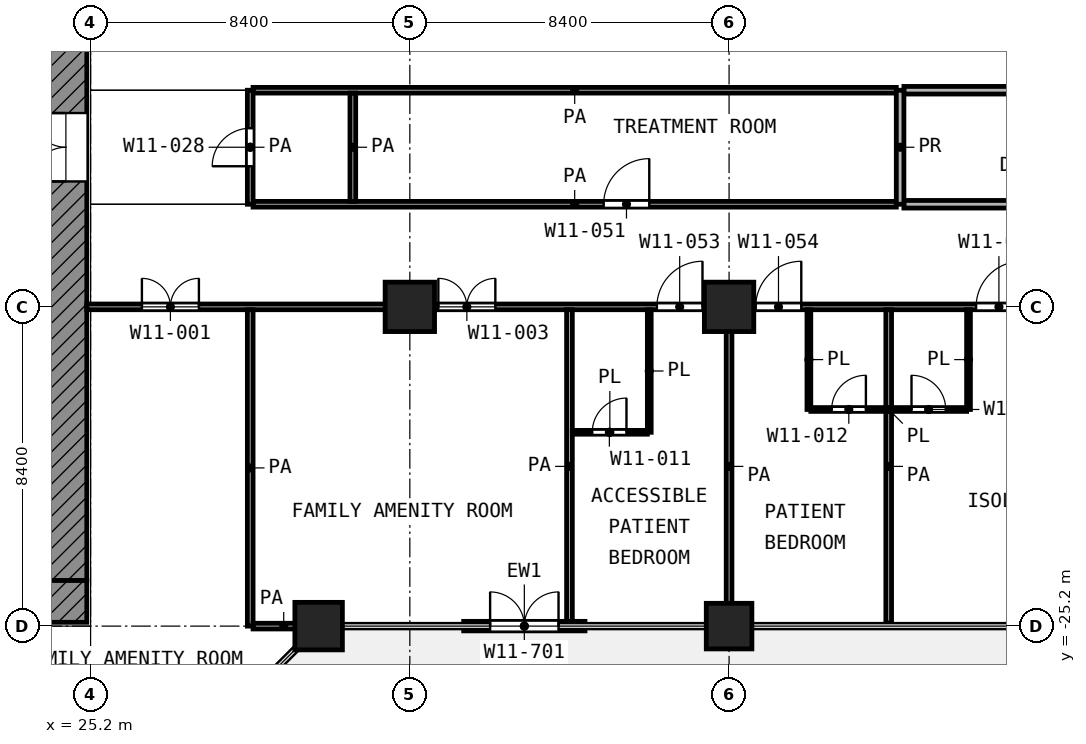
"""IFC4 building model, lengths in metres.
Left out: names, types, materials, properties, quantities, classifications, styles, units other than length and angle.
Written with IfcOpenShell. Run it as: python <this file> out.ifc"""

import sys

from ifc_helpers import new_model, si_unit, direction, frame, frame_2d, origin, origin_2d, place, context, subcontext, project, spatial, rectangle, extrude, element, fill, save


model = new_model("IFC4")
c1 = context("Model", 3, precision=1e-05, world=origin(), true_north=direction((0.0, 1.0)))
c2 = subcontext(c1, "Body", "Model", "MODEL_VIEW")
j1 = project(units=[si_unit("LENGTHUNIT", "METRE"), si_unit("PLANEANGLEUNIT", "RADIAN")], contexts=[c1])
p1 = place(None, origin())
s1 = spatial("IfcSite", under=j1, at=p1, CompositionType="ELEMENT")
p2 = place(p1, origin())
s2 = spatial("IfcBuilding", under=s1, at=p2, CompositionType="ELEMENT")
p3 = place(p2, frame((0.0, 0.0, 51.8)))
s3 = spatial("IfcBuildingStorey", under=s2, at=p3, CompositionType="ELEMENT", Elevation=51.8)
for number, where, z_axis, x_axis in (
    (1, (33.6, -16.8, 0.0), (0.0, 0.0, 1.0), (1.0, 0.0, 0.0)),
    (2, (42.0, -16.8, 0.0), (0.0, 0.0, 1.0), (1.0, 0.0, 0.0)),
):
    element("IfcColumn", number, at=place(p3, frame(where, z_axis=z_axis, x_axis=x_axis)), inside=s3, PredefinedType="COLUMN", context=c2, shape_type="SweptSolid", body=[
        extrude(rectangle(XDim=1.3, YDim=1.3, at=origin_2d()), origin(), (0.0, 0.0, 1.0), 4.2),
    ])
p4 = place(p3, frame((31.2, -25.2, 0.0), z_axis=(0.0, 0.0, 1.0), x_axis=(1.0, 0.0, 0.0)))
e3 = element("IfcColumn", 3, at=p4, inside=s3, PredefinedType="COLUMN", context=c2, shape_type="SweptSolid", body=[
    extrude(rectangle(XDim=1.25, YDim=1.25, at=origin_2d()), origin(), (0.0, 0.0, 1.0), 4.2),
])
p5 = place(p3, frame((42.0, -25.2, 0.0), z_axis=(0.0, 0.0, 1.0), x_axis=(1.0, 0.0, 0.0)))
e4 = element("IfcColumn", 4, at=p5, inside=s3, PredefinedType="COLUMN", context=c2, shape_type="SweptSolid", body=[
    extrude(rectangle(XDim=1.2, YDim=1.2, at=origin_2d()), origin(), (0.0, 0.0, 1.0), 4.2),
])
p6 = place(p3, frame((35.017, -25.2, 0.0), z_axis=(0.0, 0.0, 1.0), x_axis=(1.0, 0.0, 0.0)))
e5 = element("IfcWall", 5, at=p6, inside=s3, PredefinedType="SOLIDWALL", context=c2, shape_type="SweptSolid", body=[
    extrude(rectangle(XDim=3.192, YDim=0.25, at=frame_2d((1.596, 0.0))), origin(), (0.0, 0.0, 1.0), 3.78),
])
p7 = place(p6, frame((0.696, 0.0, 0.0)))
e6 = element("IfcOpeningElement", 6, at=p7, cuts=e5, PredefinedType="OPENING", context=c2, shape_type="SweptSolid", body=[
    extrude(rectangle(XDim=1.8, YDim=2.1, at=frame_2d((0.9, 1.05))), frame((0.0, 0.135, 0.0), z_axis=(0.0, -1.0, 0.0), x_axis=(1.0, 0.0, 0.0)), (0.0, 0.0, 1.0), 0.27),
])
p8 = place(p3, frame((24.55, -24.0, 0.0), z_axis=(0.0, 0.0, 1.0), x_axis=(0.0, 1.0, 0.0)))
e7 = element("IfcWall", 7, at=p8, inside=s3, PredefinedType="SHEAR", context=c2, shape_type="SweptSolid", body=[
    extrude(rectangle(XDim=18.6, YDim=1.1, at=frame_2d((9.3, 0.0))), origin(), (0.0, 0.0, 1.0), 3.9),
])
p9 = place(p8, frame((10.5, 0.0, 0.0)))
e8 = element("IfcOpeningElement", 8, at=p9, cuts=e7, PredefinedType="OPENING", context=c2, shape_type="SweptSolid", body=[
    extrude(rectangle(XDim=1.8, YDim=2.1, at=frame_2d((0.9, 1.05))), frame((0.0, 0.56, 0.0), z_axis=(0.0, -1.0, 0.0), x_axis=(1.0, 0.0, 0.0)), (0.0, 0.0, 1.0), 1.12),
])
p10 = place(p3, frame((24.55, -25.1, 0.0), z_axis=(0.0, 0.0, 1.0), x_axis=(0.0, 1.0, 0.0)))
e9 = element("IfcWall", 9, at=p10, inside=s3, PredefinedType="SHEAR", context=c2, shape_type="SweptSolid", body=[
    extrude(rectangle(XDim=1.1, YDim=1.1, at=frame_2d((0.55, 0.0))), origin(), (0.0, 0.0, 1.0), 3.9),
])
p11 = place(p3, frame((37.875, -20.1, 0.0), z_axis=(0.0, 0.0, 1.0), x_axis=(1.0, 0.0, 0.0)))
e10 = element("IfcWall", 10, at=p11, inside=s3, PredefinedType="PARTITIONING", context=c2, shape_type="SweptSolid", body=[
    extrude(rectangle(XDim=1.975, YDim=0.1, at=frame_2d((0.988, 0.0))), origin(), (0.0, 0.0, 1.0), 3.9),
])
p12 = place(p11, frame((0.525, 0.0, 0.0)))
e11 = element("IfcOpeningElement", 11, at=p12, cuts=e10, PredefinedType="OPENING", context=c2, shape_type="SweptSolid", body=[
    extrude(rectangle(XDim=0.9, YDim=2.1, at=frame_2d((0.45, 1.05))), frame((0.0, 0.06, 0.0), z_axis=(0.0, -1.0, 0.0), x_axis=(1.0, 0.0, 0.0)), (0.0, 0.0, 1.0), 0.12),
])
p13 = place(p3, frame((44.15, -19.5, 0.0), z_axis=(0.0, 0.0, 1.0), x_axis=(1.0, 0.0, 0.0)))
e12 = element("IfcWall", 12, at=p13, inside=s3, PredefinedType="PARTITIONING", context=c2, shape_type="SweptSolid", body=[
    extrude(rectangle(XDim=4.1, YDim=0.1, at=frame_2d((2.05, 0.0))), origin(), (0.0, 0.0, 1.0), 3.9),
])
p14 = place(p13, frame((0.55, 0.0, 0.0)))
e13 = element("IfcOpeningElement", 13, at=p14, cuts=e12, PredefinedType="OPENING", context=c2, shape_type="SweptSolid", body=[
    extrude(rectangle(XDim=0.9, YDim=2.1, at=frame_2d((0.45, 1.05))), frame((0.0, 0.06, 0.0), z_axis=(0.0, -1.0, 0.0), x_axis=(1.0, 0.0, 0.0)), (0.0, 0.0, 1.0), 0.12),
])
p15 = place(p13, frame((2.65, 0.0, 0.0)))
e14 = element("IfcOpeningElement", 14, at=p15, cuts=e12, PredefinedType="OPENING", context=c2, shape_type="SweptSolid", body=[
    extrude(rectangle(XDim=0.9, YDim=2.1, at=frame_2d((0.45, 1.05))), frame((0.0, 0.06, 0.0), z_axis=(0.0, -1.0, 0.0), x_axis=(1.0, 0.0, 0.0)), (0.0, 0.0, 1.0), 0.12),
])
p16 = place(p3, frame((39.9, -20.1, 0.0), z_axis=(0.0, 0.0, 1.0), x_axis=(0.0, 1.0, 0.0)))
e15 = element("IfcWall", 15, at=p16, inside=s3, PredefinedType="PARTITIONING", context=c2, shape_type="SweptSolid", body=[
    extrude(rectangle(XDim=3.225, YDim=0.1, at=frame_2d((1.613, 0.0))), origin(), (0.0, 0.0, 1.0), 3.9),
])
for number, where, z_axis, x_axis in (
    (16, (44.1, -19.5, 0.0), (0.0, 0.0, 1.0), (0.0, 1.0, 0.0)),
    (17, (48.3, -19.5, 0.0), (0.0, 0.0, 1.0), (0.0, 1.0, 0.0)),
):
    element("IfcWall", number, at=place(p3, frame(where, z_axis=z_axis, x_axis=x_axis)), inside=s3, PredefinedType="PARTITIONING", context=c2, shape_type="SweptSolid", body=[
        extrude(rectangle(XDim=2.625, YDim=0.1, at=frame_2d((1.312, 0.0))), origin(), (0.0, 0.0, 1.0), 3.9),
    ])
p17 = place(p3, frame((29.475, -25.2, 0.0), z_axis=(0.0, 0.0, 1.0), x_axis=(1.0, 0.0, 0.0)))
e18 = element("IfcWall", 18, at=p17, inside=s3, PredefinedType="PARTITIONING", context=c2, shape_type="SweptSolid", body=[
    extrude(rectangle(XDim=1.612, YDim=0.15, at=frame_2d((0.806, 0.0))), origin(), (0.0, 0.0, 1.0), 3.9),
])
p18 = place(p3, frame((25.1, -16.8, 0.0), z_axis=(0.0, 0.0, 1.0), x_axis=(1.0, 0.0, 0.0)))
e19 = element("IfcWall", 19, at=p18, inside=s3, PredefinedType="PARTITIONING", context=c2, shape_type="SweptSolid", body=[
    extrude(rectangle(XDim=54.62, YDim=0.15, at=frame_2d((27.31, 0.0))), origin(), (0.0, 0.0, 1.0), 3.9),
])
p19 = place(p18, frame((1.45, 0.0, 0.0)))
e20 = element("IfcOpeningElement", 20, at=p19, cuts=e19, PredefinedType="OPENING", context=c2, shape_type="SweptSolid", body=[
    extrude(rectangle(XDim=1.5, YDim=2.1, at=frame_2d((0.75, 1.05))), frame((0.0, 0.085, 0.0), z_axis=(0.0, -1.0, 0.0), x_axis=(1.0, 0.0, 0.0)), (0.0, 0.0, 1.0), 0.17),
])
p20 = place(p18, frame((9.25, 0.0, 0.0)))
e21 = element("IfcOpeningElement", 21, at=p20, cuts=e19, PredefinedType="OPENING", context=c2, shape_type="SweptSolid", body=[
    extrude(rectangle(XDim=1.5, YDim=2.1, at=frame_2d((0.75, 1.05))), frame((0.0, 0.085, 0.0), z_axis=(0.0, -1.0, 0.0), x_axis=(1.0, 0.0, 0.0)), (0.0, 0.0, 1.0), 0.17),
])
p21 = place(p18, frame((15.0, 0.0, 0.0)))
e22 = element("IfcOpeningElement", 22, at=p21, cuts=e19, PredefinedType="OPENING", context=c2, shape_type="SweptSolid", body=[
    extrude(rectangle(XDim=1.2, YDim=2.1, at=frame_2d((0.6, 1.05))), frame((0.0, 0.085, 0.0), z_axis=(0.0, -1.0, 0.0), x_axis=(1.0, 0.0, 0.0)), (0.0, 0.0, 1.0), 0.17),
])
p22 = place(p18, frame((17.6, 0.0, 0.0)))
e23 = element("IfcOpeningElement", 23, at=p22, cuts=e19, PredefinedType="OPENING", context=c2, shape_type="SweptSolid", body=[
    extrude(rectangle(XDim=1.2, YDim=2.1, at=frame_2d((0.6, 1.05))), frame((0.0, 0.085, 0.0), z_axis=(0.0, -1.0, 0.0), x_axis=(1.0, 0.0, 0.0)), (0.0, 0.0, 1.0), 0.17),
])
p23 = place(p18, frame((26.2, 0.0, 0.0)))
e24 = element("IfcOpeningElement", 24, at=p23, cuts=e19, PredefinedType="OPENING", context=c2, shape_type="SweptSolid", body=[
    extrude(rectangle(XDim=1.2, YDim=2.1, at=frame_2d((0.6, 1.05))), frame((0.0, 0.085, 0.0), z_axis=(0.0, -1.0, 0.0), x_axis=(1.0, 0.0, 0.0)), (0.0, 0.0, 1.0), 0.17),
])
p24 = place(p18, frame((23.4, 0.0, 0.0)))
e25 = element("IfcOpeningElement", 25, at=p24, cuts=e19, PredefinedType="OPENING", context=c2, shape_type="SweptSolid", body=[
    extrude(rectangle(XDim=1.2, YDim=2.1, at=frame_2d((0.6, 1.05))), frame((0.0, 0.085, 0.0), z_axis=(0.0, -1.0, 0.0), x_axis=(1.0, 0.0, 0.0)), (0.0, 0.0, 1.0), 0.17),
])
p25 = place(p18, frame((28.45, 0.0, 0.0)))
e26 = element("IfcOpeningElement", 26, at=p25, cuts=e19, PredefinedType="OPENING", context=c2, shape_type="SweptSolid", body=[
    extrude(rectangle(XDim=1.2, YDim=2.1, at=frame_2d((0.6, 1.05))), frame((0.0, 0.085, 0.0), z_axis=(0.0, -1.0, 0.0), x_axis=(1.0, 0.0, 0.0)), (0.0, 0.0, 1.0), 0.17),
])
p26 = place(p18, frame((31.8, 0.0, 0.0)))
e27 = element("IfcOpeningElement", 27, at=p26, cuts=e19, PredefinedType="OPENING", context=c2, shape_type="SweptSolid", body=[
    extrude(rectangle(XDim=1.2, YDim=2.1, at=frame_2d((0.6, 1.05))), frame((0.0, 0.085, 0.0), z_axis=(0.0, -1.0, 0.0), x_axis=(1.0, 0.0, 0.0)), (0.0, 0.0, 1.0), 0.17),
])
p27 = place(p18, frame((30.35, 0.0, 0.0)))
e28 = element("IfcOpeningElement", 28, at=p27, cuts=e19, PredefinedType="OPENING", context=c2, shape_type="SweptSolid", body=[
    extrude(rectangle(XDim=1.1, YDim=2.1, at=frame_2d((0.55, 1.05))), frame((0.0, 0.085, 0.0), z_axis=(0.0, -1.0, 0.0), x_axis=(1.0, 0.0, 0.0)), (0.0, 0.0, 1.0), 0.17),
])
p28 = place(p18, frame((40.2, 0.0, 0.0)))
e29 = element("IfcOpeningElement", 29, at=p28, cuts=e19, PredefinedType="OPENING", context=c2, shape_type="SweptSolid", body=[
    extrude(rectangle(XDim=1.2, YDim=2.1, at=frame_2d((0.6, 1.05))), frame((0.0, 0.085, 0.0), z_axis=(0.0, -1.0, 0.0), x_axis=(1.0, 0.0, 0.0)), (0.0, 0.0, 1.0), 0.17),
])
p29 = place(p18, frame((43.1, 0.0, 0.0)))
e30 = element("IfcOpeningElement", 30, at=p29, cuts=e19, PredefinedType="OPENING", context=c2, shape_type="SweptSolid", body=[
    extrude(rectangle(XDim=1.2, YDim=2.1, at=frame_2d((0.6, 1.05))), frame((0.0, 0.085, 0.0), z_axis=(0.0, -1.0, 0.0), x_axis=(1.0, 0.0, 0.0)), (0.0, 0.0, 1.0), 0.17),
])
p30 = place(p18, frame((51.2, 0.0, 0.0)))
e31 = element("IfcOpeningElement", 31, at=p30, cuts=e19, PredefinedType="OPENING", context=c2, shape_type="SweptSolid", body=[
    extrude(rectangle(XDim=1.5, YDim=2.1, at=frame_2d((0.75, 1.05))), frame((0.0, 0.085, 0.0), z_axis=(0.0, -1.0, 0.0), x_axis=(1.0, 0.0, 0.0)), (0.0, 0.0, 1.0), 0.17),
])
p31 = place(p3, frame((29.475, -14.1, 0.0), z_axis=(0.0, 0.0, 1.0), x_axis=(1.0, 0.0, 0.0)))
e32 = element("IfcWall", 32, at=p31, inside=s3, PredefinedType="PARTITIONING", context=c2, shape_type="SweptSolid", body=[
    extrude(rectangle(XDim=16.925, YDim=0.15, at=frame_2d((8.462, 0.0))), origin(), (0.0, 0.0, 1.0), 3.9),
])
p32 = place(p31, frame((9.225, 0.0, 0.0)))
e33 = element("IfcOpeningElement", 33, at=p32, cuts=e32, PredefinedType="OPENING", context=c2, shape_type="SweptSolid", body=[
    extrude(rectangle(XDim=1.2, YDim=2.1, at=frame_2d((0.6, 1.05))), frame((0.0, 0.085, 0.0), z_axis=(0.0, -1.0, 0.0), x_axis=(1.0, 0.0, 0.0)), (0.0, 0.0, 1.0), 0.17),
])
p33 = place(p3, frame((29.475, -11.1, 0.0), z_axis=(0.0, 0.0, 1.0), x_axis=(1.0, 0.0, 0.0)))
e34 = element("IfcWall", 34, at=p33, inside=s3, PredefinedType="PARTITIONING", context=c2, shape_type="SweptSolid", body=[
    extrude(rectangle(XDim=16.925, YDim=0.15, at=frame_2d((8.462, 0.0))), origin(), (0.0, 0.0, 1.0), 3.9),
])
p34 = place(p3, frame((29.4, -25.2, 0.0), z_axis=(0.0, 0.0, 1.0), x_axis=(0.0, 1.0, 0.0)))
e35 = element("IfcWall", 35, at=p34, inside=s3, PredefinedType="PARTITIONING", context=c2, shape_type="SweptSolid", body=[
    extrude(rectangle(XDim=8.325, YDim=0.15, at=frame_2d((4.163, 0.0))), origin(), (0.0, 0.0, 1.0), 3.9),
])
p35 = place(p3, frame((29.4, -14.1, 0.0), z_axis=(0.0, 0.0, 1.0), x_axis=(0.0, 1.0, 0.0)))
e36 = element("IfcWall", 36, at=p35, inside=s3, PredefinedType="PARTITIONING", context=c2, shape_type="SweptSolid", body=[
    extrude(rectangle(XDim=3.0, YDim=0.15, at=frame_2d((1.5, 0.0))), origin(), (0.0, 0.0, 1.0), 3.9),
])
p36 = place(p35, frame((1.0, 0.0, 0.0)))
e37 = element("IfcOpeningElement", 37, at=p36, cuts=e36, PredefinedType="OPENING", context=c2, shape_type="SweptSolid", body=[
    extrude(rectangle(XDim=1.0, YDim=2.1, at=frame_2d((0.5, 1.05))), frame((0.0, 0.085, 0.0), z_axis=(0.0, -1.0, 0.0), x_axis=(1.0, 0.0, 0.0)), (0.0, 0.0, 1.0), 0.17),
])
p37 = place(p3, frame((32.1, -14.025, 0.0), z_axis=(0.0, 0.0, 1.0), x_axis=(0.0, 1.0, 0.0)))
e38 = element("IfcWall", 38, at=p37, inside=s3, PredefinedType="PARTITIONING", context=c2, shape_type="SweptSolid", body=[
    extrude(rectangle(XDim=2.85, YDim=0.15, at=frame_2d((1.425, 0.0))), origin(), (0.0, 0.0, 1.0), 3.9),
])
for number, where, z_axis, x_axis in (
    (39, (37.8, -25.12, 0.0), (0.0, 0.0, 1.0), (0.0, 1.0, 0.0)),
    (40, (42.0, -25.12, 0.0), (0.0, 0.0, 1.0), (0.0, 1.0, 0.0)),
    (41, (46.2, -25.12, 0.0), (0.0, 0.0, 1.0), (0.0, 1.0, 0.0)),
):
    element("IfcWall", number, at=place(p3, frame(where, z_axis=z_axis, x_axis=x_axis)), inside=s3, PredefinedType="PARTITIONING", context=c2, shape_type="SweptSolid", body=[
        extrude(rectangle(XDim=8.245, YDim=0.15, at=frame_2d((4.123, 0.0))), origin(), (0.0, 0.0, 1.0), 3.9),
    ])
p38 = place(p3, frame((46.6, -14.1, 0.0), z_axis=(0.0, 0.0, 1.0), x_axis=(1.0, 0.0, 0.0)))
e42 = element("IfcWall", 42, at=p38, inside=s3, PredefinedType="PARTITIONING", context=c2, shape_type="SweptSolid", body=[
    extrude(rectangle(XDim=12.1, YDim=0.2, at=frame_2d((6.05, 0.0))), origin(), (0.0, 0.0, 1.0), 3.9),
])
p39 = place(p3, frame((46.6, -11.1, 0.0), z_axis=(0.0, 0.0, 1.0), x_axis=(1.0, 0.0, 0.0)))
e43 = element("IfcWall", 43, at=p39, inside=s3, PredefinedType="PARTITIONING", context=c2, shape_type="SweptSolid", body=[
    extrude(rectangle(XDim=12.1, YDim=0.2, at=frame_2d((6.05, 0.0))), origin(), (0.0, 0.0, 1.0), 3.9),
])
p40 = place(p39, frame((5.45, 0.0, 0.0)))
e44 = element("IfcOpeningElement", 44, at=p40, cuts=e43, PredefinedType="OPENING", context=c2, shape_type="SweptSolid", body=[
    extrude(rectangle(XDim=1.2, YDim=2.1, at=frame_2d((0.6, 1.05))), frame((0.0, 0.11, 0.0), z_axis=(0.0, -1.0, 0.0), x_axis=(1.0, 0.0, 0.0)), (0.0, 0.0, 1.0), 0.22),
])
p41 = place(p3, frame((46.5, -14.1, 0.0), z_axis=(0.0, 0.0, 1.0), x_axis=(0.0, 1.0, 0.0)))
e45 = element("IfcWall", 45, at=p41, inside=s3, PredefinedType="PARTITIONING", context=c2, shape_type="SweptSolid", body=[
    extrude(rectangle(XDim=3.0, YDim=0.2, at=frame_2d((1.5, 0.0))), origin(), (0.0, 0.0, 1.0), 3.9),
])
p42 = place(p7, origin())
e46 = element("IfcDoor", 46, at=p42, inside=s3, OperationType="DOUBLE_DOOR_SINGLE_SWING", PredefinedType="DOOR", context=c2, shape_type="SweptSolid", body=[
    extrude(rectangle(XDim=1.8, YDim=2.1, at=frame_2d((0.9, 1.05))), frame((0.0, 0.025, 0.0), z_axis=(0.0, -1.0, 0.0), x_axis=(1.0, 0.0, 0.0)), (0.0, 0.0, 1.0), 0.05),
])
fill(e6, e46)
p43 = place(p9, origin())
e47 = element("IfcDoor", 47, at=p43, inside=s3, OperationType="DOUBLE_DOOR_SINGLE_SWING", PredefinedType="DOOR", context=c2, shape_type="SweptSolid", body=[
    extrude(rectangle(XDim=1.8, YDim=2.1, at=frame_2d((0.9, 1.05))), frame((0.0, 0.025, 0.0), z_axis=(0.0, -1.0, 0.0), x_axis=(1.0, 0.0, 0.0)), (0.0, 0.0, 1.0), 0.05),
])
fill(e8, e47)
p44 = place(p19, origin())
e48 = element("IfcDoor", 48, at=p44, inside=s3, OperationType="DOUBLE_DOOR_SINGLE_SWING", PredefinedType="DOOR", context=c2, shape_type="SweptSolid", body=[
    extrude(rectangle(XDim=1.5, YDim=2.1, at=frame_2d((0.75, 1.05))), frame((0.0, 0.025, 0.0), z_axis=(0.0, -1.0, 0.0), x_axis=(1.0, 0.0, 0.0)), (0.0, 0.0, 1.0), 0.05),
])
fill(e20, e48)
p45 = place(p32, origin())
e49 = element("IfcDoor", 49, at=p45, inside=s3, OperationType="SINGLE_SWING_RIGHT", PredefinedType="DOOR", context=c2, shape_type="SweptSolid", body=[
    extrude(rectangle(XDim=1.2, YDim=2.1, at=frame_2d((0.6, 1.05))), frame((0.0, 0.025, 0.0), z_axis=(0.0, -1.0, 0.0), x_axis=(1.0, 0.0, 0.0)), (0.0, 0.0, 1.0), 0.05),
])
fill(e33, e49)
p46 = place(p20, origin())
e50 = element("IfcDoor", 50, at=p46, inside=s3, OperationType="DOUBLE_DOOR_SINGLE_SWING", PredefinedType="DOOR", context=c2, shape_type="SweptSolid", body=[
    extrude(rectangle(XDim=1.5, YDim=2.1, at=frame_2d((0.75, 1.05))), frame((0.0, 0.025, 0.0), z_axis=(0.0, -1.0, 0.0), x_axis=(1.0, 0.0, 0.0)), (0.0, 0.0, 1.0), 0.05),
])
fill(e21, e50)
p47 = place(p21, origin())
e51 = element("IfcDoor", 51, at=p47, inside=s3, OperationType="SINGLE_SWING_RIGHT", PredefinedType="DOOR", context=c2, shape_type="SweptSolid", body=[
    extrude(rectangle(XDim=1.2, YDim=2.1, at=frame_2d((0.6, 1.05))), frame((0.0, 0.025, 0.0), z_axis=(0.0, -1.0, 0.0), x_axis=(1.0, 0.0, 0.0)), (0.0, 0.0, 1.0), 0.05),
])
fill(e22, e51)
p48 = place(p12, origin())
e52 = element("IfcDoor", 52, at=p48, inside=s3, OperationType="SINGLE_SWING_RIGHT", PredefinedType="DOOR", context=c2, shape_type="SweptSolid", body=[
    extrude(rectangle(XDim=0.9, YDim=2.1, at=frame_2d((0.45, 1.05))), frame((0.0, 0.025, 0.0), z_axis=(0.0, -1.0, 0.0), x_axis=(1.0, 0.0, 0.0)), (0.0, 0.0, 1.0), 0.05),
])
fill(e11, e52)
p49 = place(p22, origin())
e53 = element("IfcDoor", 53, at=p49, inside=s3, OperationType="SINGLE_SWING_RIGHT", PredefinedType="DOOR", context=c2, shape_type="SweptSolid", body=[
    extrude(rectangle(XDim=1.2, YDim=2.1, at=frame_2d((0.6, 1.05))), frame((0.0, 0.025, 0.0), z_axis=(0.0, -1.0, 0.0), x_axis=(1.0, 0.0, 0.0)), (0.0, 0.0, 1.0), 0.05),
])
fill(e23, e53)
p50 = place(p14, origin())
e54 = element("IfcDoor", 54, at=p50, inside=s3, OperationType="SINGLE_SWING_RIGHT", PredefinedType="DOOR", context=c2, shape_type="SweptSolid", body=[
    extrude(rectangle(XDim=0.9, YDim=2.1, at=frame_2d((0.45, 1.05))), frame((0.0, 0.025, 0.0), z_axis=(0.0, -1.0, 0.0), x_axis=(1.0, 0.0, 0.0)), (0.0, 0.0, 1.0), 0.05),
])
fill(e13, e54)
p51 = place(p24, origin())
e55 = element("IfcDoor", 55, at=p51, inside=s3, OperationType="SINGLE_SWING_RIGHT", PredefinedType="DOOR", context=c2, shape_type="SweptSolid", body=[
    extrude(rectangle(XDim=1.2, YDim=2.1, at=frame_2d((0.6, 1.05))), frame((0.0, 0.025, 0.0), z_axis=(0.0, -1.0, 0.0), x_axis=(1.0, 0.0, 0.0)), (0.0, 0.0, 1.0), 0.05),
])
fill(e25, e55)
p52 = place(p15, origin())
e56 = element("IfcDoor", 56, at=p52, inside=s3, OperationType="SINGLE_SWING_LEFT", PredefinedType="DOOR", context=c2, shape_type="SweptSolid", body=[
    extrude(rectangle(XDim=0.9, YDim=2.1, at=frame_2d((0.45, 1.05))), frame((0.0, 0.025, 0.0), z_axis=(0.0, -1.0, 0.0), x_axis=(1.0, 0.0, 0.0)), (0.0, 0.0, 1.0), 0.05),
])
fill(e14, e56)
p53 = place(p36, origin())
e57 = element("IfcDoor", 57, at=p53, inside=s3, OperationType="SINGLE_SWING_LEFT", PredefinedType="DOOR", context=c2, shape_type="SweptSolid", body=[
    extrude(rectangle(XDim=1.0, YDim=2.1, at=frame_2d((0.5, 1.05))), frame((0.0, 0.025, 0.0), z_axis=(0.0, -1.0, 0.0), x_axis=(1.0, 0.0, 0.0)), (0.0, 0.0, 1.0), 0.05),
])
fill(e37, e57)
save(model, sys.argv[1])
